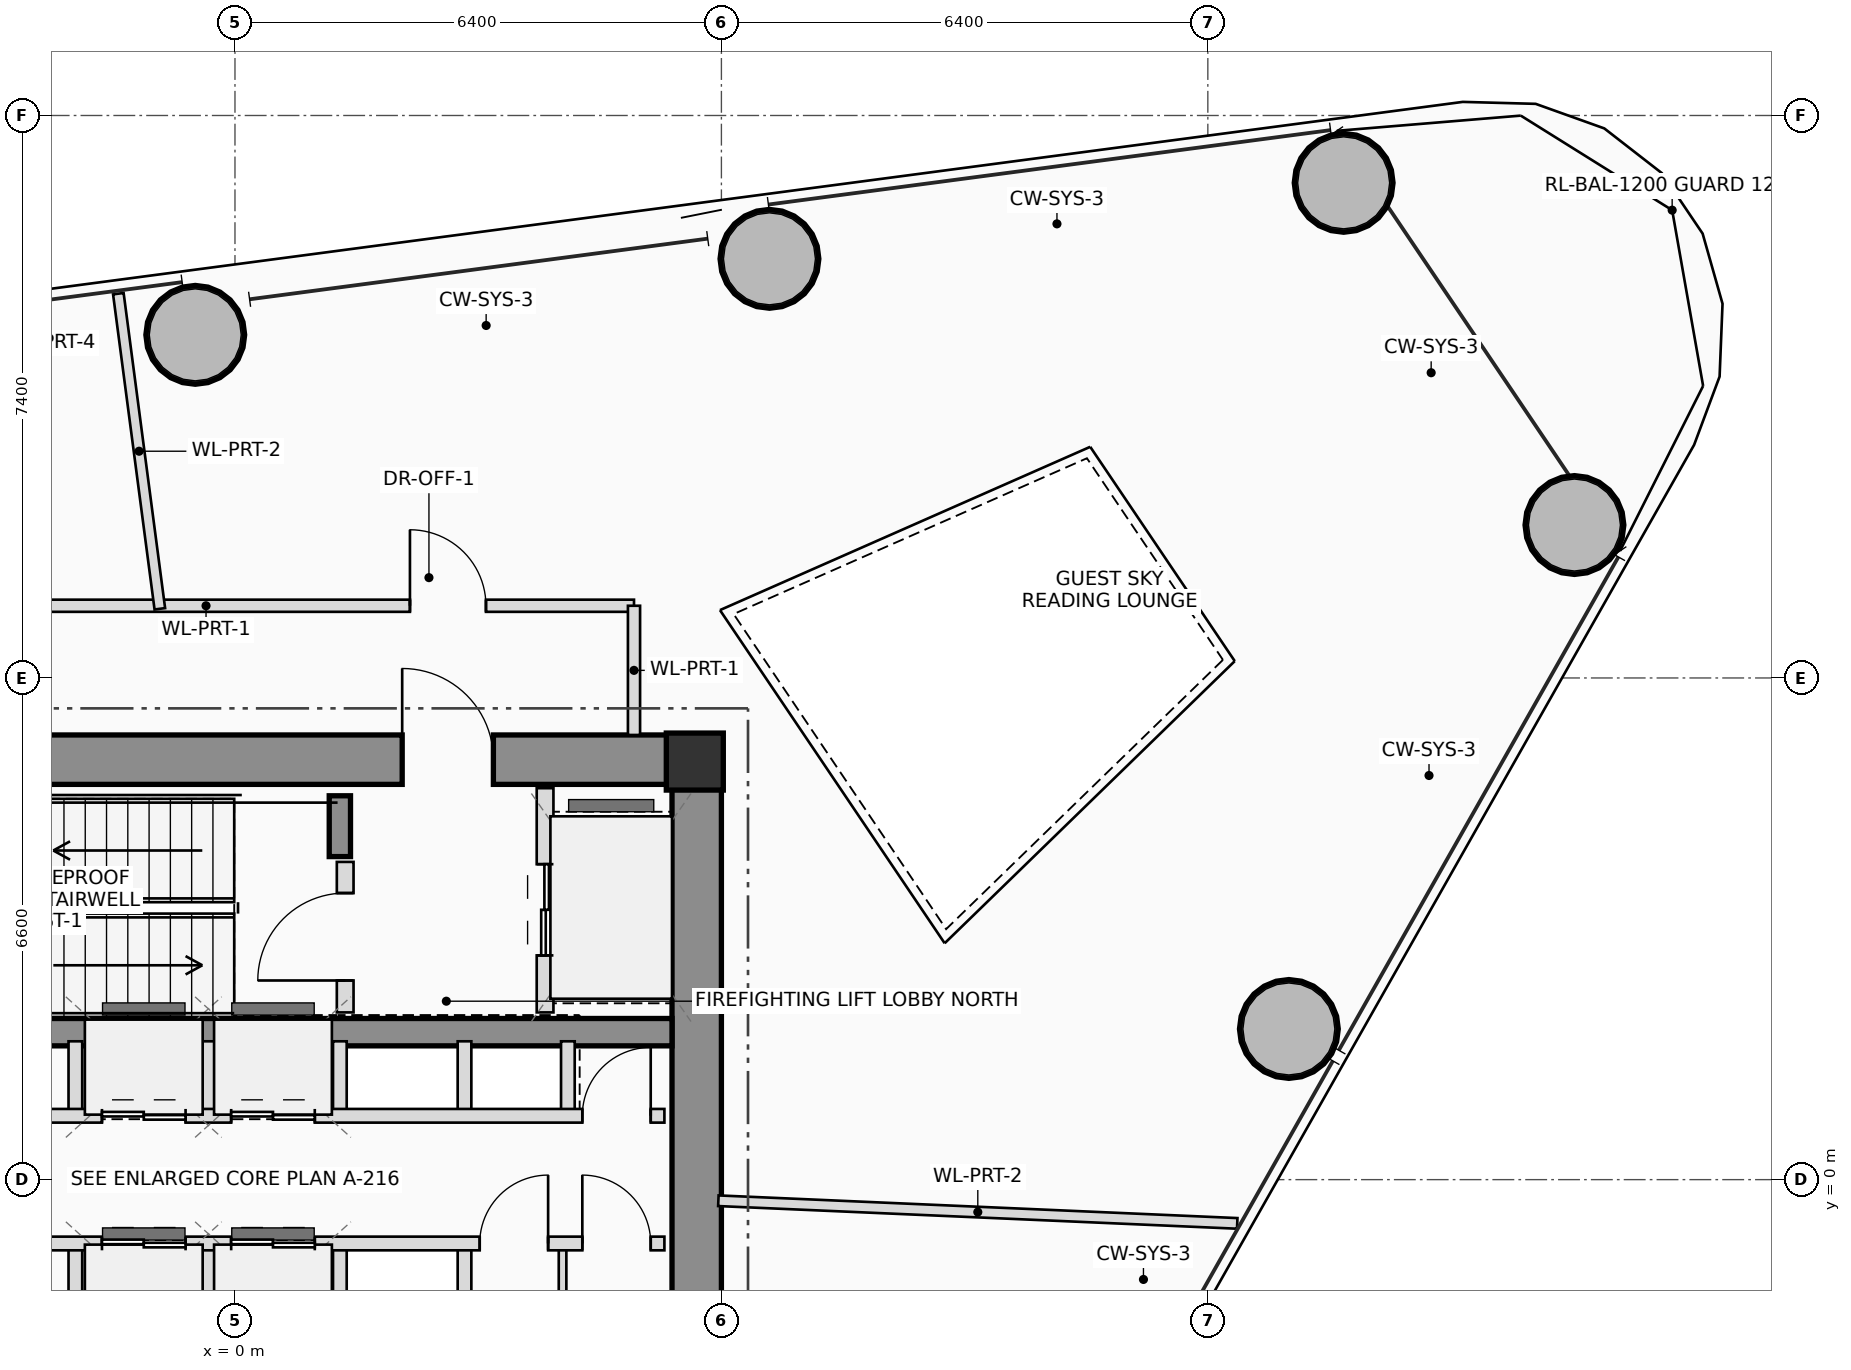
"""IFC4 building model, lengths in metres.
Left out: names, types, materials, properties, quantities, classifications, styles, units other than length and angle.
Written with IfcOpenShell. Run it as: python <this file> out.ifc"""

import sys

from ifc_helpers import new_model, si_unit, direction, frame, frame_2d, origin, origin_2d, place, context, subcontext, project, spatial, rectangle, hollow_circle, extrude, source, transform, mapped, element, fill, save


model = new_model("IFC4")
c1 = context("Model", 3, precision=1e-05, world=origin(), true_north=direction((0.0, 1.0)))
c2 = subcontext(c1, "Body", "Model", "MODEL_VIEW")
j1 = project(units=[si_unit("LENGTHUNIT", "METRE"), si_unit("PLANEANGLEUNIT", "RADIAN")], contexts=[c1])
p1 = place(None, origin())
s1 = spatial("IfcSite", under=j1, at=p1, CompositionType="ELEMENT")
p2 = place(p1, origin())
s2 = spatial("IfcBuilding", under=s1, at=p2, CompositionType="ELEMENT")
p3 = place(p2, frame((0.0, 0.0, 172.55)))
s3 = spatial("IfcBuildingStorey", under=s2, at=p3, CompositionType="ELEMENT", Elevation=172.55)
m1 = source(origin(), c2, "Body", "SweptSolid", [
    extrude(rectangle(XDim=0.75, YDim=0.75, at=origin_2d()), origin(), (0.0, 0.0, 1.0), 3.45),
])
p4 = place(p3, frame((6.05, 5.5, 0.0), z_axis=(0.0, 0.0, 1.0), x_axis=(1.0, 0.0, 0.0)))
e1 = element("IfcColumn", 1, at=p4, inside=s3, PredefinedType="COLUMN", context=c2, shape_type="MappedRepresentation", body=[
    mapped(m1, transform((0.0, 0.0, 0.0), scale=1.0)),
])
p5 = place(p3, frame((-6.4, 5.525, 0.0), z_axis=(0.0, 0.0, 1.0), x_axis=(1.0, 0.0, 0.0)))
e2 = element("IfcWall", 2, at=p5, inside=s3, PredefinedType="SHEAR", context=c2, shape_type="SweptSolid", body=[
    extrude(rectangle(XDim=12.8, YDim=0.65, at=frame_2d((6.4, 0.0))), origin(), (0.0, 0.0, 1.0), 3.45),
])
p6 = place(p5, frame((8.6, 0.0, 0.0)))
e3 = element("IfcOpeningElement", 3, at=p6, cuts=e2, PredefinedType="OPENING", context=c2, shape_type="SweptSolid", body=[
    extrude(rectangle(XDim=1.2, YDim=2.2, at=frame_2d((0.6, 1.1))), frame((0.0, 0.335, 0.0), z_axis=(0.0, -1.0, 0.0), x_axis=(1.0, 0.0, 0.0)), (0.0, 0.0, 1.0), 0.67),
])
p7 = place(p3, frame((6.075, -5.2, 0.0), z_axis=(0.0, 0.0, 1.0), x_axis=(0.0, 1.0, 0.0)))
e4 = element("IfcWall", 4, at=p7, inside=s3, PredefinedType="SHEAR", context=c2, shape_type="SweptSolid", body=[
    extrude(rectangle(XDim=10.4, YDim=0.65, at=frame_2d((5.2, 0.0))), origin(), (0.0, 0.0, 1.0), 3.45),
])
p8 = place(p3, frame((-5.75, 1.94, 0.0), z_axis=(0.0, 0.0, 1.0), x_axis=(1.0, 0.0, 0.0)))
e5 = element("IfcWall", 5, at=p8, inside=s3, PredefinedType="SHEAR", context=c2, shape_type="SweptSolid", body=[
    extrude(rectangle(XDim=11.5, YDim=0.36, at=frame_2d((5.75, 0.0))), origin(), (0.0, 0.0, 1.0), 3.45),
])
p9 = place(p3, frame((1.38, 4.25, 0.0), z_axis=(0.0, 0.0, 1.0), x_axis=(0.0, 1.0, 0.0)))
e6 = element("IfcWall", 6, at=p9, inside=s3, PredefinedType="SHEAR", context=c2, shape_type="SweptSolid", body=[
    extrude(rectangle(XDim=0.8, YDim=0.28, at=frame_2d((0.4, 0.0))), origin(), (0.0, 0.0, 1.0), 3.45),
])
m2 = source(origin(), c2, "Body", "SweptSolid", [
    extrude(hollow_circle(Radius=0.65, WallThickness=0.045, at=origin_2d()), origin(), (0.0, 0.0, 1.0), 3.45),
])
for number, where, z_axis, x_axis in (
    (7, (13.866, 1.982, 0.0), (0.0, 0.0, 1.0), (1.0, 0.0, 0.0)),
    (8, (17.624, 8.612, 0.0), (0.0, 0.0, 1.0), (1.0, 0.0, 0.0)),
    (9, (14.587, 13.114, 0.0), (0.0, 0.0, 1.0), (1.0, 0.0, 0.0)),
    (10, (7.032, 12.114, 0.0), (0.0, 0.0, 1.0), (1.0, 0.0, 0.0)),
    (11, (-0.522, 11.114, 0.0), (0.0, 0.0, 1.0), (1.0, 0.0, 0.0)),
):
    element("IfcColumn", number, at=place(p3, frame(where, z_axis=z_axis, x_axis=x_axis)), inside=s3, PredefinedType="COLUMN", context=c2, shape_type="MappedRepresentation", body=[
        mapped(m2, transform((0.0, 0.0, 0.0), scale=1.0)),
    ])
p10 = place(p3, frame((1.45, 2.2, 0.0), z_axis=(0.0, 0.0, 1.0), x_axis=(0.0, 1.0, 0.0)))
e12 = element("IfcWall", 12, at=p10, inside=s3, PredefinedType="PLUMBINGWALL", context=c2, shape_type="SweptSolid", body=[
    extrude(rectangle(XDim=1.98, YDim=0.22, at=frame_2d((0.99, 0.0))), origin(), (0.0, 0.0, 1.0), 3.25),
])
p11 = place(p10, frame((0.42, 0.0, 0.0)))
e13 = element("IfcOpeningElement", 13, at=p11, cuts=e12, PredefinedType="OPENING", context=c2, shape_type="SweptSolid", body=[
    extrude(rectangle(XDim=1.15, YDim=2.15, at=frame_2d((0.575, 1.075))), frame((0.0, 0.12, 0.0), z_axis=(0.0, -1.0, 0.0), x_axis=(1.0, 0.0, 0.0)), (0.0, 0.0, 1.0), 0.24),
])
p12 = place(p3, frame((4.08, 2.2, 0.0), z_axis=(0.0, 0.0, 1.0), x_axis=(0.0, 1.0, 0.0)))
e14 = element("IfcWall", 14, at=p12, inside=s3, PredefinedType="PLUMBINGWALL", context=c2, shape_type="SweptSolid", body=[
    extrude(rectangle(XDim=2.95, YDim=0.22, at=frame_2d((1.475, 0.0))), origin(), (0.0, 0.0, 1.0), 3.25),
])
p13 = place(p12, frame((0.75, 0.0, 0.0)))
e15 = element("IfcOpeningElement", 15, at=p13, cuts=e14, PredefinedType="OPENING", context=c2, shape_type="SweptSolid", body=[
    extrude(rectangle(XDim=1.2, YDim=2.25, at=frame_2d((0.6, 1.125))), frame((0.0, 0.12, 0.0), z_axis=(0.0, -1.0, 0.0), x_axis=(1.0, 0.0, 0.0)), (0.0, 0.0, 1.0), 0.24),
])
for number, where, z_axis, x_axis in (
    (16, (-2.1, 0.84, 0.0), (0.0, 0.0, 1.0), (0.0, 1.0, 0.0)),
    (17, (-2.1, -1.82, 0.0), (0.0, 0.0, 1.0), (0.0, 1.0, 0.0)),
    (18, (-0.35, 0.84, 0.0), (0.0, 0.0, 1.0), (0.0, 1.0, 0.0)),
    (19, (-0.35, -1.82, 0.0), (0.0, 0.0, 1.0), (0.0, 1.0, 0.0)),
    (20, (1.38, 0.84, 0.0), (0.0, 0.0, 1.0), (0.0, 1.0, 0.0)),
    (21, (1.38, -1.82, 0.0), (0.0, 0.0, 1.0), (0.0, 1.0, 0.0)),
    (22, (3.02, 0.84, 0.0), (0.0, 0.0, 1.0), (0.0, 1.0, 0.0)),
    (23, (4.38, 0.84, 0.0), (0.0, 0.0, 1.0), (0.0, 1.0, 0.0)),
    (24, (3.02, -1.82, 0.0), (0.0, 0.0, 1.0), (0.0, 1.0, 0.0)),
):
    element("IfcWall", number, at=place(p3, frame(where, z_axis=z_axis, x_axis=x_axis)), inside=s3, PredefinedType="PLUMBINGWALL", context=c2, shape_type="SweptSolid", body=[
        extrude(rectangle(XDim=0.98, YDim=0.18, at=frame_2d((0.49, 0.0))), origin(), (0.0, 0.0, 1.0), 3.25),
    ])
p14 = place(p3, frame((4.31, -1.82, 0.0), z_axis=(0.0, 0.0, 1.0), x_axis=(0.0, 1.0, 0.0)))
e25 = element("IfcWall", 25, at=p14, inside=s3, PredefinedType="PARTITIONING", context=c2, shape_type="SweptSolid", body=[
    extrude(rectangle(XDim=0.98, YDim=0.1, at=frame_2d((0.49, 0.0))), origin(), (0.0, 0.0, 1.0), 3.25),
])
p15 = place(p3, frame((-5.68, 0.84, 0.0), z_axis=(0.0, 0.0, 1.0), x_axis=(1.0, 0.0, 0.0)))
e26 = element("IfcWall", 26, at=p15, inside=s3, PredefinedType="PLUMBINGWALL", context=c2, shape_type="SweptSolid", body=[
    extrude(rectangle(XDim=11.33, YDim=0.18, at=frame_2d((5.665, 0.0))), origin(), (0.0, 0.0, 1.0), 3.25),
])
p16 = place(p15, frame((1.58, 0.0, 0.0)))
e27 = element("IfcOpeningElement", 27, at=p16, cuts=e26, PredefinedType="OPENING", context=c2, shape_type="SweptSolid", body=[
    extrude(rectangle(XDim=0.92, YDim=2.1, at=frame_2d((0.46, 1.05))), frame((0.0, 0.1, 0.0), z_axis=(0.0, -1.0, 0.0), x_axis=(1.0, 0.0, 0.0)), (0.0, 0.0, 1.0), 0.2),
])
p17 = place(p15, frame((3.93, 0.0, 0.0)))
e28 = element("IfcOpeningElement", 28, at=p17, cuts=e26, PredefinedType="OPENING", context=c2, shape_type="SweptSolid", body=[
    extrude(rectangle(XDim=1.1, YDim=2.2, at=frame_2d((0.55, 1.1))), frame((0.0, 0.1, 0.0), z_axis=(0.0, -1.0, 0.0), x_axis=(1.0, 0.0, 0.0)), (0.0, 0.0, 1.0), 0.2),
])
p18 = place(p15, frame((5.63, 0.0, 0.0)))
e29 = element("IfcOpeningElement", 29, at=p18, cuts=e26, PredefinedType="OPENING", context=c2, shape_type="SweptSolid", body=[
    extrude(rectangle(XDim=1.1, YDim=2.2, at=frame_2d((0.55, 1.1))), frame((0.0, 0.1, 0.0), z_axis=(0.0, -1.0, 0.0), x_axis=(1.0, 0.0, 0.0)), (0.0, 0.0, 1.0), 0.2),
])
p19 = place(p15, frame((10.25, 0.0, 0.0)))
e30 = element("IfcOpeningElement", 30, at=p19, cuts=e26, PredefinedType="OPENING", context=c2, shape_type="SweptSolid", body=[
    extrude(rectangle(XDim=0.9, YDim=2.05, at=frame_2d((0.45, 1.025))), frame((0.0, 0.1, 0.0), z_axis=(0.0, -1.0, 0.0), x_axis=(1.0, 0.0, 0.0)), (0.0, 0.0, 1.0), 0.2),
])
p20 = place(p3, frame((-5.68, -0.84, 0.0), z_axis=(0.0, 0.0, 1.0), x_axis=(1.0, 0.0, 0.0)))
e31 = element("IfcWall", 31, at=p20, inside=s3, PredefinedType="PLUMBINGWALL", context=c2, shape_type="SweptSolid", body=[
    extrude(rectangle(XDim=11.33, YDim=0.18, at=frame_2d((5.665, 0.0))), origin(), (0.0, 0.0, 1.0), 3.25),
])
p21 = place(p20, frame((1.18, 0.0, 0.0)))
e32 = element("IfcOpeningElement", 32, at=p21, cuts=e31, PredefinedType="OPENING", context=c2, shape_type="SweptSolid", body=[
    extrude(rectangle(XDim=0.9, YDim=2.05, at=frame_2d((0.45, 1.025))), frame((0.0, 0.1, 0.0), z_axis=(0.0, -1.0, 0.0), x_axis=(1.0, 0.0, 0.0)), (0.0, 0.0, 1.0), 0.2),
])
p22 = place(p20, frame((3.93, 0.0, 0.0)))
e33 = element("IfcOpeningElement", 33, at=p22, cuts=e31, PredefinedType="OPENING", context=c2, shape_type="SweptSolid", body=[
    extrude(rectangle(XDim=1.1, YDim=2.2, at=frame_2d((0.55, 1.1))), frame((0.0, 0.1, 0.0), z_axis=(0.0, -1.0, 0.0), x_axis=(1.0, 0.0, 0.0)), (0.0, 0.0, 1.0), 0.2),
])
p23 = place(p20, frame((5.63, 0.0, 0.0)))
e34 = element("IfcOpeningElement", 34, at=p23, cuts=e31, PredefinedType="OPENING", context=c2, shape_type="SweptSolid", body=[
    extrude(rectangle(XDim=1.1, YDim=2.2, at=frame_2d((0.55, 1.1))), frame((0.0, 0.1, 0.0), z_axis=(0.0, -1.0, 0.0), x_axis=(1.0, 0.0, 0.0)), (0.0, 0.0, 1.0), 0.2),
])
p24 = place(p20, frame((8.9, 0.0, 0.0)))
e35 = element("IfcOpeningElement", 35, at=p24, cuts=e31, PredefinedType="OPENING", context=c2, shape_type="SweptSolid", body=[
    extrude(rectangle(XDim=0.9, YDim=2.05, at=frame_2d((0.45, 1.025))), frame((0.0, 0.1, 0.0), z_axis=(0.0, -1.0, 0.0), x_axis=(1.0, 0.0, 0.0)), (0.0, 0.0, 1.0), 0.2),
])
p25 = place(p20, frame((10.25, 0.0, 0.0)))
e36 = element("IfcOpeningElement", 36, at=p25, cuts=e31, PredefinedType="OPENING", context=c2, shape_type="SweptSolid", body=[
    extrude(rectangle(XDim=0.9, YDim=2.05, at=frame_2d((0.45, 1.025))), frame((0.0, 0.1, 0.0), z_axis=(0.0, -1.0, 0.0), x_axis=(1.0, 0.0, 0.0)), (0.0, 0.0, 1.0), 0.2),
])
p26 = place(p3, frame((-6.36, 7.55, 0.0), z_axis=(0.0, 0.0, 1.0), x_axis=(1.0, 0.0, 0.0)))
e37 = element("IfcWall", 37, at=p26, inside=s3, PredefinedType="PARTITIONING", context=c2, shape_type="SweptSolid", body=[
    extrude(rectangle(XDim=11.61, YDim=0.16, at=frame_2d((5.805, 0.0))), origin(), (0.0, 0.0, 1.0), 2.605),
])
p27 = place(p26, frame((2.246, 0.0, 0.0)))
e38 = element("IfcOpeningElement", 38, at=p27, cuts=e37, PredefinedType="OPENING", context=c2, shape_type="SweptSolid", body=[
    extrude(rectangle(XDim=1.05, YDim=2.2, at=frame_2d((0.525, 1.1))), frame((0.0, 0.09, 0.0), z_axis=(0.0, -1.0, 0.0), x_axis=(1.0, 0.0, 0.0)), (0.0, 0.0, 1.0), 0.18),
])
p28 = place(p26, frame((8.662, 0.0, 0.0)))
e39 = element("IfcOpeningElement", 39, at=p28, cuts=e37, PredefinedType="OPENING", context=c2, shape_type="SweptSolid", body=[
    extrude(rectangle(XDim=1.0, YDim=2.25, at=frame_2d((0.5, 1.125))), frame((0.0, 0.09, 0.0), z_axis=(0.0, -1.0, 0.0), x_axis=(1.0, 0.0, 0.0)), (0.0, 0.0, 1.0), 0.18),
])
p29 = place(p3, frame((5.25, 7.55, 0.0), z_axis=(0.0, 0.0, 1.0), x_axis=(0.0, -1.0, 0.0)))
e40 = element("IfcWall", 40, at=p29, inside=s3, PredefinedType="PARTITIONING", context=c2, shape_type="SweptSolid", body=[
    extrude(rectangle(XDim=1.7, YDim=0.16, at=frame_2d((0.85, 0.0))), origin(), (0.0, 0.0, 1.0), 3.25),
])
p30 = place(p3, frame((6.36, -0.278, 0.0), z_axis=(0.0, 0.0, 1.0), x_axis=(0.999047983793, -0.043624833281, 0.0)))
e41 = element("IfcWall", 41, at=p30, inside=s3, PredefinedType="PARTITIONING", context=c2, shape_type="SweptSolid", body=[
    extrude(rectangle(XDim=6.833, YDim=0.14, at=frame_2d((3.417, 0.0))), origin(), (0.0, 0.0, 1.0), 2.605),
])
p31 = place(p3, frame((-0.989, 7.51, 0.0), z_axis=(0.0, 0.0, 1.0), x_axis=(-0.130484717168, 0.991450320785, 0.0)))
e42 = element("IfcWall", 42, at=p31, inside=s3, PredefinedType="PARTITIONING", context=c2, shape_type="SweptSolid", body=[
    extrude(rectangle(XDim=4.182, YDim=0.14, at=frame_2d((2.091, 0.0))), origin(), (0.0, 0.0, 1.0), 2.605),
])
p32 = place(p6, origin())
e43 = element("IfcDoor", 43, at=p32, inside=s3, OperationType="SINGLE_SWING_LEFT", PredefinedType="DOOR", context=c2, shape_type="SweptSolid", body=[
    extrude(rectangle(XDim=1.2, YDim=2.2, at=frame_2d((0.6, 1.1))), frame((0.0, 0.025, 0.0), z_axis=(0.0, -1.0, 0.0), x_axis=(1.0, 0.0, 0.0)), (0.0, 0.0, 1.0), 0.05),
])
fill(e3, e43)
p33 = place(p11, origin())
e44 = element("IfcDoor", 44, at=p33, inside=s3, OperationType="SINGLE_SWING_LEFT", PredefinedType="DOOR", context=c2, shape_type="SweptSolid", body=[
    extrude(rectangle(XDim=1.15, YDim=2.15, at=frame_2d((0.575, 1.075))), frame((0.0, 0.025, 0.0), z_axis=(0.0, -1.0, 0.0), x_axis=(1.0, 0.0, 0.0)), (0.0, 0.0, 1.0), 0.05),
])
fill(e13, e44)
p34 = place(p13, origin())
e45 = element("IfcDoor", 45, at=p34, inside=s3, OperationType="DOUBLE_DOOR_SLIDING", PredefinedType="DOOR", context=c2, shape_type="SweptSolid", body=[
    extrude(rectangle(XDim=1.2, YDim=2.25, at=frame_2d((0.6, 1.125))), frame((0.0, 0.025, 0.0), z_axis=(0.0, -1.0, 0.0), x_axis=(1.0, 0.0, 0.0)), (0.0, 0.0, 1.0), 0.05),
])
fill(e15, e45)
p35 = place(p17, origin())
e46 = element("IfcDoor", 46, at=p35, inside=s3, OperationType="DOUBLE_DOOR_SLIDING", PredefinedType="DOOR", context=c2, shape_type="SweptSolid", body=[
    extrude(rectangle(XDim=1.1, YDim=2.2, at=frame_2d((0.55, 1.1))), frame((0.0, 0.025, 0.0), z_axis=(0.0, -1.0, 0.0), x_axis=(1.0, 0.0, 0.0)), (0.0, 0.0, 1.0), 0.05),
])
fill(e28, e46)
p36 = place(p18, origin())
e47 = element("IfcDoor", 47, at=p36, inside=s3, OperationType="DOUBLE_DOOR_SLIDING", PredefinedType="DOOR", context=c2, shape_type="SweptSolid", body=[
    extrude(rectangle(XDim=1.1, YDim=2.2, at=frame_2d((0.55, 1.1))), frame((0.0, 0.025, 0.0), z_axis=(0.0, -1.0, 0.0), x_axis=(1.0, 0.0, 0.0)), (0.0, 0.0, 1.0), 0.05),
])
fill(e29, e47)
p37 = place(p19, origin())
e48 = element("IfcDoor", 48, at=p37, inside=s3, OperationType="SINGLE_SWING_RIGHT", PredefinedType="DOOR", context=c2, shape_type="SweptSolid", body=[
    extrude(rectangle(XDim=0.9, YDim=2.05, at=frame_2d((0.45, 1.025))), frame((0.0, 0.025, 0.0), z_axis=(0.0, -1.0, 0.0), x_axis=(1.0, 0.0, 0.0)), (0.0, 0.0, 1.0), 0.05),
])
fill(e30, e48)
p38 = place(p22, origin())
e49 = element("IfcDoor", 49, at=p38, inside=s3, OperationType="DOUBLE_DOOR_SLIDING", PredefinedType="DOOR", context=c2, shape_type="SweptSolid", body=[
    extrude(rectangle(XDim=1.1, YDim=2.2, at=frame_2d((0.55, 1.1))), frame((0.0, 0.025, 0.0), z_axis=(0.0, -1.0, 0.0), x_axis=(1.0, 0.0, 0.0)), (0.0, 0.0, 1.0), 0.05),
])
fill(e33, e49)
p39 = place(p23, origin())
e50 = element("IfcDoor", 50, at=p39, inside=s3, OperationType="DOUBLE_DOOR_SLIDING", PredefinedType="DOOR", context=c2, shape_type="SweptSolid", body=[
    extrude(rectangle(XDim=1.1, YDim=2.2, at=frame_2d((0.55, 1.1))), frame((0.0, 0.025, 0.0), z_axis=(0.0, -1.0, 0.0), x_axis=(1.0, 0.0, 0.0)), (0.0, 0.0, 1.0), 0.05),
])
fill(e34, e50)
p40 = place(p24, origin())
e51 = element("IfcDoor", 51, at=p40, inside=s3, OperationType="SINGLE_SWING_RIGHT", PredefinedType="DOOR", context=c2, shape_type="SweptSolid", body=[
    extrude(rectangle(XDim=0.9, YDim=2.05, at=frame_2d((0.45, 1.025))), frame((0.0, 0.025, 0.0), z_axis=(0.0, -1.0, 0.0), x_axis=(1.0, 0.0, 0.0)), (0.0, 0.0, 1.0), 0.05),
])
fill(e35, e51)
p41 = place(p25, origin())
e52 = element("IfcDoor", 52, at=p41, inside=s3, OperationType="SINGLE_SWING_LEFT", PredefinedType="DOOR", context=c2, shape_type="SweptSolid", body=[
    extrude(rectangle(XDim=0.9, YDim=2.05, at=frame_2d((0.45, 1.025))), frame((0.0, 0.025, 0.0), z_axis=(0.0, -1.0, 0.0), x_axis=(1.0, 0.0, 0.0)), (0.0, 0.0, 1.0), 0.05),
])
fill(e36, e52)
p42 = place(p28, origin())
e53 = element("IfcDoor", 53, at=p42, inside=s3, OperationType="SINGLE_SWING_LEFT", PredefinedType="DOOR", context=c2, shape_type="SweptSolid", body=[
    extrude(rectangle(XDim=1.0, YDim=2.25, at=frame_2d((0.5, 1.125))), frame((0.0, 0.025, 0.0), z_axis=(0.0, -1.0, 0.0), x_axis=(1.0, 0.0, 0.0)), (0.0, 0.0, 1.0), 0.05),
])
fill(e39, e53)
save(model, sys.argv[1])
